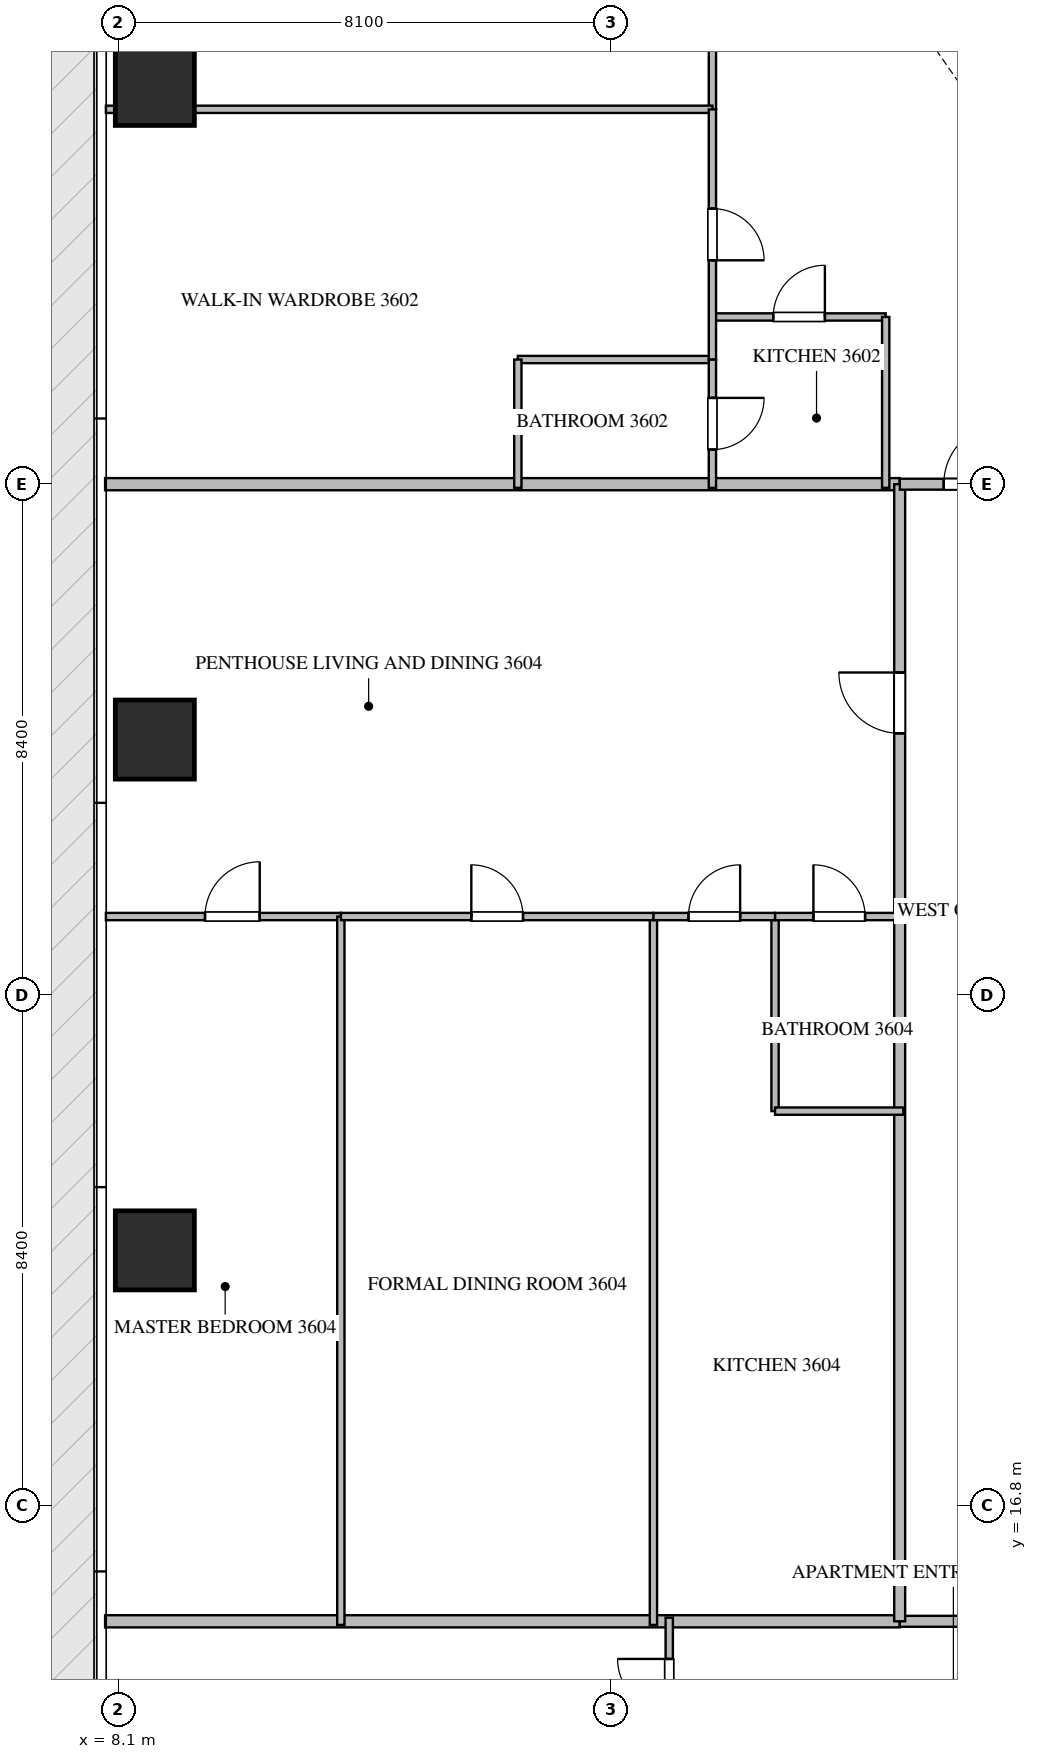
"""IFC4 building model, lengths in metres.
Left out: names, types, materials, properties, quantities, classifications, styles, units other than length and angle.
Written with IfcOpenShell. Run it as: python <this file> out.ifc"""

import sys

from ifc_helpers import new_model, si_unit, direction, frame, frame_2d, origin, origin_2d, place, context, subcontext, project, spatial, rectangle, extrude, source, transform, mapped, element, fill, save


model = new_model("IFC4")
c1 = context("Model", 3, precision=1e-05, world=origin(), true_north=direction((0.0, 1.0)))
c2 = subcontext(c1, "Body", "Model", "MODEL_VIEW")
j1 = project(units=[si_unit("LENGTHUNIT", "METRE"), si_unit("PLANEANGLEUNIT", "RADIAN")], contexts=[c1])
p1 = place(None, origin())
s1 = spatial("IfcSite", under=j1, at=p1, CompositionType="ELEMENT")
p2 = place(p1, origin())
s2 = spatial("IfcBuilding", under=s1, at=p2, CompositionType="ELEMENT")
p3 = place(p2, frame((0.0, 0.0, 146.4)))
s3 = spatial("IfcBuildingStorey", under=s2, at=p3, CompositionType="ELEMENT", Elevation=146.4)
m1 = source(origin(), c2, "Body", "SweptSolid", [
    extrude(rectangle(XDim=1.3, YDim=1.3, at=origin_2d()), origin(), (0.0, 0.0, 1.0), 3.75),
])
for number, where, z_axis, x_axis in (
    (1, (8.7, 21.0, -0.26), (0.0, 0.0, 1.0), (1.0, 0.0, 0.0)),
    (2, (8.7, 29.4, -0.26), (0.0, 0.0, 1.0), (1.0, 0.0, 0.0)),
    (3, (8.7, 40.15, -0.26), (0.0, 0.0, 1.0), (1.0, 0.0, 0.0)),
):
    element("IfcColumn", number, at=place(p3, frame(where, z_axis=z_axis, x_axis=x_axis)), inside=s3, PredefinedType="COLUMN", context=c2, shape_type="MappedRepresentation", body=[
        mapped(m1, transform((0.0, 0.0, 0.0), scale=1.0)),
    ])
for number, where, z_axis, x_axis in (
    (4, (7.882, 14.9, 0.0), (0.0, 0.0, 1.0), (1.0, 0.0, 0.0)),
    (5, (7.882, 33.6, 0.0), (0.0, 0.0, 1.0), (1.0, 0.0, 0.0)),
):
    element("IfcWall", number, at=place(p3, frame(where, z_axis=z_axis, x_axis=x_axis)), inside=s3, PredefinedType="PARTITIONING", context=c2, shape_type="SweptSolid", body=[
        extrude(rectangle(XDim=13.068, YDim=0.2, at=frame_2d((6.534, 0.0))), origin(), (0.0, 0.0, 1.0), 3.49),
    ])
p4 = place(p3, frame((20.952, 14.9, 0.0), z_axis=(0.0, 0.0, 1.0), x_axis=(1.0, 0.0, 0.0)))
e6 = element("IfcWall", 6, at=p4, inside=s3, PredefinedType="PARTITIONING", context=c2, shape_type="SweptSolid", body=[
    extrude(rectangle(XDim=22.896, YDim=0.18, at=frame_2d((11.448, 0.0))), origin(), (0.0, 0.0, 1.0), 3.49),
])
p5 = place(p4, frame((7.51, 0.0, 0.0)))
e7 = element("IfcOpeningElement", 7, at=p5, cuts=e6, PredefinedType="OPENING", context=c2, shape_type="SweptSolid", body=[
    extrude(rectangle(XDim=1.0, YDim=2.15, at=frame_2d((0.5, 1.075))), frame((0.0, 0.1, 0.0), z_axis=(0.0, -1.0, 0.0), x_axis=(1.0, 0.0, 0.0)), (0.0, 0.0, 1.0), 0.2),
])
p6 = place(p3, frame((20.95, 14.9, 0.0), z_axis=(0.0, 0.0, 1.0), x_axis=(0.0, 1.0, 0.0)))
e8 = element("IfcWall", 8, at=p6, inside=s3, PredefinedType="PARTITIONING", context=c2, shape_type="SweptSolid", body=[
    extrude(rectangle(XDim=18.7, YDim=0.18, at=frame_2d((9.35, 0.0))), origin(), (0.0, 0.0, 1.0), 3.49),
])
p7 = place(p6, frame((14.603, 0.0, 0.0)))
e9 = element("IfcOpeningElement", 9, at=p7, cuts=e8, PredefinedType="OPENING", context=c2, shape_type="SweptSolid", body=[
    extrude(rectangle(XDim=1.0, YDim=2.15, at=frame_2d((0.5, 1.075))), frame((0.0, 0.1, 0.0), z_axis=(0.0, -1.0, 0.0), x_axis=(1.0, 0.0, 0.0)), (0.0, 0.0, 1.0), 0.2),
])
p8 = place(p3, frame((20.952, 33.6, 0.0), z_axis=(0.0, 0.0, 1.0), x_axis=(1.0, 0.0, 0.0)))
e10 = element("IfcWall", 10, at=p8, inside=s3, PredefinedType="PARTITIONING", context=c2, shape_type="SweptSolid", body=[
    extrude(rectangle(XDim=2.446, YDim=0.18, at=frame_2d((1.223, 0.0))), origin(), (0.0, 0.0, 1.0), 3.49),
])
p9 = place(p8, frame((0.723, 0.0, 0.0)))
e11 = element("IfcOpeningElement", 11, at=p9, cuts=e10, PredefinedType="OPENING", context=c2, shape_type="SweptSolid", body=[
    extrude(rectangle(XDim=1.0, YDim=2.15, at=frame_2d((0.5, 1.075))), frame((0.0, 0.1, 0.0), z_axis=(0.0, -1.0, 0.0), x_axis=(1.0, 0.0, 0.0)), (0.0, 0.0, 1.0), 0.2),
])
p10 = place(p3, frame((17.16, 12.752, 0.0), z_axis=(0.0, 0.0, 1.0), x_axis=(0.0, 1.0, 0.0)))
e12 = element("IfcWall", 12, at=p10, inside=s3, PredefinedType="PARTITIONING", context=c2, shape_type="SweptSolid", body=[
    extrude(rectangle(XDim=2.208, YDim=0.12, at=frame_2d((1.104, 0.0))), origin(), (0.0, 0.0, 1.0), 3.49),
])
p11 = place(p10, frame((0.679, 0.0, 0.0)))
e13 = element("IfcOpeningElement", 13, at=p11, cuts=e12, PredefinedType="OPENING", context=c2, shape_type="SweptSolid", body=[
    extrude(rectangle(XDim=0.85, YDim=2.1, at=frame_2d((0.425, 1.05))), frame((0.0, 0.07, 0.0), z_axis=(0.0, -1.0, 0.0), x_axis=(1.0, 0.0, 0.0)), (0.0, 0.0, 1.0), 0.14),
])
p12 = place(p3, frame((17.87, 36.35, 0.0), z_axis=(0.0, 0.0, 1.0), x_axis=(1.0, 0.0, 0.0)))
e14 = element("IfcWall", 14, at=p12, inside=s3, PredefinedType="PARTITIONING", context=c2, shape_type="SweptSolid", body=[
    extrude(rectangle(XDim=2.85, YDim=0.12, at=frame_2d((1.425, 0.0))), origin(), (0.0, 0.0, 1.0), 3.49),
])
p13 = place(p12, frame((1.0, 0.0, 0.0)))
e15 = element("IfcOpeningElement", 15, at=p13, cuts=e14, PredefinedType="OPENING", context=c2, shape_type="SweptSolid", body=[
    extrude(rectangle(XDim=0.85, YDim=2.1, at=frame_2d((0.425, 1.05))), frame((0.0, 0.07, 0.0), z_axis=(0.0, -1.0, 0.0), x_axis=(1.0, 0.0, 0.0)), (0.0, 0.0, 1.0), 0.14),
])
p14 = place(p3, frame((20.72, 36.35, 0.0), z_axis=(0.0, 0.0, 1.0), x_axis=(0.0, -1.0, 0.0)))
e16 = element("IfcWall", 16, at=p14, inside=s3, PredefinedType="PARTITIONING", context=c2, shape_type="SweptSolid", body=[
    extrude(rectangle(XDim=2.81, YDim=0.12, at=frame_2d((1.405, 0.0))), origin(), (0.0, 0.0, 1.0), 3.49),
])
p15 = place(p3, frame((17.87, 48.905, 0.0), z_axis=(0.0, 0.0, 1.0), x_axis=(0.0, -1.0, 0.0)))
e17 = element("IfcWall", 17, at=p15, inside=s3, PredefinedType="PARTITIONING", context=c2, shape_type="SweptSolid", body=[
    extrude(rectangle(XDim=9.14, YDim=0.12, at=frame_2d((4.57, 0.0))), origin(), (0.0, 0.0, 1.0), 3.49),
])
p16 = place(p15, frame((4.532, 0.0, 0.0)))
e18 = element("IfcOpeningElement", 18, at=p16, cuts=e17, PredefinedType="OPENING", context=c2, shape_type="SweptSolid", body=[
    extrude(rectangle(XDim=0.9, YDim=2.1, at=frame_2d((0.45, 1.05))), frame((0.0, 0.07, 0.0), z_axis=(0.0, -1.0, 0.0), x_axis=(1.0, 0.0, 0.0)), (0.0, 0.0, 1.0), 0.14),
])
p17 = place(p3, frame((7.895, 39.765, 0.0), z_axis=(0.0, 0.0, 1.0), x_axis=(1.0, 0.0, 0.0)))
e19 = element("IfcWall", 19, at=p17, inside=s3, PredefinedType="PARTITIONING", context=c2, shape_type="SweptSolid", body=[
    extrude(rectangle(XDim=9.975, YDim=0.12, at=frame_2d((4.988, 0.0))), origin(), (0.0, 0.0, 1.0), 3.49),
])
p18 = place(p3, frame((14.67, 35.65, 0.0), z_axis=(0.0, 0.0, 1.0), x_axis=(1.0, 0.0, 0.0)))
e20 = element("IfcWall", 20, at=p18, inside=s3, PredefinedType="PARTITIONING", context=c2, shape_type="SweptSolid", body=[
    extrude(rectangle(XDim=3.2, YDim=0.12, at=frame_2d((1.6, 0.0))), origin(), (0.0, 0.0, 1.0), 3.49),
])
p19 = place(p3, frame((14.67, 35.65, 0.0), z_axis=(0.0, 0.0, 1.0), x_axis=(0.0, -1.0, 0.0)))
e21 = element("IfcWall", 21, at=p19, inside=s3, PredefinedType="PARTITIONING", context=c2, shape_type="SweptSolid", body=[
    extrude(rectangle(XDim=2.11, YDim=0.12, at=frame_2d((1.055, 0.0))), origin(), (0.0, 0.0, 1.0), 3.49),
])
p20 = place(p3, frame((17.87, 39.763, 0.0), z_axis=(0.0, 0.0, 1.0), x_axis=(0.0, -1.0, 0.0)))
e22 = element("IfcWall", 22, at=p20, inside=s3, PredefinedType="PARTITIONING", context=c2, shape_type="SweptSolid", body=[
    extrude(rectangle(XDim=4.113, YDim=0.12, at=frame_2d((2.057, 0.0))), origin(), (0.0, 0.0, 1.0), 3.49),
])
p21 = place(p20, frame((1.631, 0.0, 0.0)))
e23 = element("IfcOpeningElement", 23, at=p21, cuts=e22, PredefinedType="OPENING", context=c2, shape_type="SweptSolid", body=[
    extrude(rectangle(XDim=0.85, YDim=2.1, at=frame_2d((0.425, 1.05))), frame((0.0, 0.07, 0.0), z_axis=(0.0, -1.0, 0.0), x_axis=(1.0, 0.0, 0.0)), (0.0, 0.0, 1.0), 0.14),
])
p22 = place(p3, frame((17.87, 35.648, 0.0), z_axis=(0.0, 0.0, 1.0), x_axis=(0.0, -1.0, 0.0)))
e24 = element("IfcWall", 24, at=p22, inside=s3, PredefinedType="PARTITIONING", context=c2, shape_type="SweptSolid", body=[
    extrude(rectangle(XDim=2.108, YDim=0.12, at=frame_2d((1.054, 0.0))), origin(), (0.0, 0.0, 1.0), 3.49),
])
p23 = place(p22, frame((0.629, 0.0, 0.0)))
e25 = element("IfcOpeningElement", 25, at=p23, cuts=e24, PredefinedType="OPENING", context=c2, shape_type="SweptSolid", body=[
    extrude(rectangle(XDim=0.85, YDim=2.1, at=frame_2d((0.425, 1.05))), frame((0.0, 0.07, 0.0), z_axis=(0.0, -1.0, 0.0), x_axis=(1.0, 0.0, 0.0)), (0.0, 0.0, 1.0), 0.14),
])
p24 = place(p3, frame((7.895, 26.49, 0.0), z_axis=(0.0, 0.0, 1.0), x_axis=(1.0, 0.0, 0.0)))
e26 = element("IfcWall", 26, at=p24, inside=s3, PredefinedType="PARTITIONING", context=c2, shape_type="SweptSolid", body=[
    extrude(rectangle(XDim=3.864, YDim=0.12, at=frame_2d((1.932, 0.0))), origin(), (0.0, 0.0, 1.0), 3.49),
])
p25 = place(p24, frame((1.63, 0.0, 0.0)))
e27 = element("IfcOpeningElement", 27, at=p25, cuts=e26, PredefinedType="OPENING", context=c2, shape_type="SweptSolid", body=[
    extrude(rectangle(XDim=0.9, YDim=2.1, at=frame_2d((0.45, 1.05))), frame((0.0, 0.07, 0.0), z_axis=(0.0, -1.0, 0.0), x_axis=(1.0, 0.0, 0.0)), (0.0, 0.0, 1.0), 0.14),
])
p26 = place(p3, frame((11.759, 14.84, 0.0), z_axis=(0.0, 0.0, 1.0), x_axis=(0.0, 1.0, 0.0)))
e28 = element("IfcWall", 28, at=p26, inside=s3, PredefinedType="PARTITIONING", context=c2, shape_type="SweptSolid", body=[
    extrude(rectangle(XDim=11.65, YDim=0.12, at=frame_2d((5.825, 0.0))), origin(), (0.0, 0.0, 1.0), 3.49),
])
p27 = place(p3, frame((16.9, 14.84, 0.0), z_axis=(0.0, 0.0, 1.0), x_axis=(0.0, 1.0, 0.0)))
e29 = element("IfcWall", 29, at=p27, inside=s3, PredefinedType="PARTITIONING", context=c2, shape_type="SweptSolid", body=[
    extrude(rectangle(XDim=11.65, YDim=0.12, at=frame_2d((5.825, 0.0))), origin(), (0.0, 0.0, 1.0), 2.972),
])
p28 = place(p3, frame((18.9, 23.29, 0.0), z_axis=(0.0, 0.0, 1.0), x_axis=(0.0, 1.0, 0.0)))
e30 = element("IfcWall", 30, at=p28, inside=s3, PredefinedType="PARTITIONING", context=c2, shape_type="SweptSolid", body=[
    extrude(rectangle(XDim=3.2, YDim=0.12, at=frame_2d((1.6, 0.0))), origin(), (0.0, 0.0, 1.0), 3.49),
])
p29 = place(p3, frame((18.9, 23.29, 0.0), z_axis=(0.0, 0.0, 1.0), x_axis=(1.0, 0.0, 0.0)))
e31 = element("IfcWall", 31, at=p29, inside=s3, PredefinedType="PARTITIONING", context=c2, shape_type="SweptSolid", body=[
    extrude(rectangle(XDim=2.11, YDim=0.12, at=frame_2d((1.055, 0.0))), origin(), (0.0, 0.0, 1.0), 3.49),
])
p30 = place(p3, frame((11.761, 26.49, 0.0), z_axis=(0.0, 0.0, 1.0), x_axis=(1.0, 0.0, 0.0)))
e32 = element("IfcWall", 32, at=p30, inside=s3, PredefinedType="PARTITIONING", context=c2, shape_type="SweptSolid", body=[
    extrude(rectangle(XDim=5.139, YDim=0.12, at=frame_2d((2.569, 0.0))), origin(), (0.0, 0.0, 1.0), 3.49),
])
p31 = place(p30, frame((2.144, 0.0, 0.0)))
e33 = element("IfcOpeningElement", 33, at=p31, cuts=e32, PredefinedType="OPENING", context=c2, shape_type="SweptSolid", body=[
    extrude(rectangle(XDim=0.85, YDim=2.1, at=frame_2d((0.425, 1.05))), frame((0.0, 0.07, 0.0), z_axis=(0.0, -1.0, 0.0), x_axis=(1.0, 0.0, 0.0)), (0.0, 0.0, 1.0), 0.14),
])
p32 = place(p3, frame((16.902, 26.49, 0.0), z_axis=(0.0, 0.0, 1.0), x_axis=(1.0, 0.0, 0.0)))
e34 = element("IfcWall", 34, at=p32, inside=s3, PredefinedType="PARTITIONING", context=c2, shape_type="SweptSolid", body=[
    extrude(rectangle(XDim=1.998, YDim=0.12, at=frame_2d((0.999, 0.0))), origin(), (0.0, 0.0, 1.0), 3.49),
])
p33 = place(p32, frame((0.574, 0.0, 0.0)))
e35 = element("IfcOpeningElement", 35, at=p33, cuts=e34, PredefinedType="OPENING", context=c2, shape_type="SweptSolid", body=[
    extrude(rectangle(XDim=0.85, YDim=2.1, at=frame_2d((0.425, 1.05))), frame((0.0, 0.07, 0.0), z_axis=(0.0, -1.0, 0.0), x_axis=(1.0, 0.0, 0.0)), (0.0, 0.0, 1.0), 0.14),
])
p34 = place(p3, frame((18.902, 26.49, 0.0), z_axis=(0.0, 0.0, 1.0), x_axis=(1.0, 0.0, 0.0)))
e36 = element("IfcWall", 36, at=p34, inside=s3, PredefinedType="PARTITIONING", context=c2, shape_type="SweptSolid", body=[
    extrude(rectangle(XDim=2.108, YDim=0.12, at=frame_2d((1.054, 0.0))), origin(), (0.0, 0.0, 1.0), 3.49),
])
p35 = place(p34, frame((0.629, 0.0, 0.0)))
e37 = element("IfcOpeningElement", 37, at=p35, cuts=e36, PredefinedType="OPENING", context=c2, shape_type="SweptSolid", body=[
    extrude(rectangle(XDim=0.85, YDim=2.1, at=frame_2d((0.425, 1.05))), frame((0.0, 0.07, 0.0), z_axis=(0.0, -1.0, 0.0), x_axis=(1.0, 0.0, 0.0)), (0.0, 0.0, 1.0), 0.14),
])
m2 = source(origin(), c2, "Body", "SweptSolid", [
    extrude(rectangle(XDim=1.0, YDim=2.15, at=frame_2d((0.5, 1.075))), frame((0.0, 0.025, 0.0), z_axis=(0.0, -1.0, 0.0), x_axis=(1.0, 0.0, 0.0)), (0.0, 0.0, 1.0), 0.05),
])
p36 = place(p7, origin())
e38 = element("IfcDoor", 38, at=p36, inside=s3, OperationType="SINGLE_SWING_RIGHT", PredefinedType="DOOR", context=c2, shape_type="MappedRepresentation", body=[
    mapped(m2, transform((0.0, 0.0, 0.0), scale=1.0)),
])
fill(e9, e38)
p37 = place(p9, origin())
e39 = element("IfcDoor", 39, at=p37, inside=s3, OperationType="SINGLE_SWING_RIGHT", PredefinedType="DOOR", context=c2, shape_type="MappedRepresentation", body=[
    mapped(m2, transform((0.0, 0.0, 0.0), scale=1.0)),
])
fill(e11, e39)
m3 = source(origin(), c2, "Body", "SweptSolid", [
    extrude(rectangle(XDim=0.85, YDim=2.1, at=frame_2d((0.425, 1.05))), frame((0.0, 0.025, 0.0), z_axis=(0.0, -1.0, 0.0), x_axis=(1.0, 0.0, 0.0)), (0.0, 0.0, 1.0), 0.05),
])
p38 = place(p11, origin())
e40 = element("IfcDoor", 40, at=p38, inside=s3, OperationType="SINGLE_SWING_RIGHT", PredefinedType="DOOR", context=c2, shape_type="MappedRepresentation", body=[
    mapped(m3, transform((0.0, 0.0, 0.0), scale=1.0)),
])
fill(e13, e40)
p39 = place(p13, origin())
e41 = element("IfcDoor", 41, at=p39, inside=s3, OperationType="SINGLE_SWING_RIGHT", PredefinedType="DOOR", context=c2, shape_type="MappedRepresentation", body=[
    mapped(m3, transform((0.0, 0.0, 0.0), scale=1.0)),
])
fill(e15, e41)
p40 = place(p21, origin())
e42 = element("IfcDoor", 42, at=p40, inside=s3, OperationType="SINGLE_SWING_RIGHT", PredefinedType="DOOR", context=c2, shape_type="MappedRepresentation", body=[
    mapped(m3, transform((0.0, 0.0, 0.0), scale=1.0)),
])
fill(e23, e42)
p41 = place(p23, origin())
e43 = element("IfcDoor", 43, at=p41, inside=s3, OperationType="SINGLE_SWING_LEFT", PredefinedType="DOOR", context=c2, shape_type="MappedRepresentation", body=[
    mapped(m3, transform((0.0, 0.0, 0.0), scale=1.0)),
])
fill(e25, e43)
m4 = source(origin(), c2, "Body", "SweptSolid", [
    extrude(rectangle(XDim=0.9, YDim=2.1, at=frame_2d((0.45, 1.05))), frame((0.0, 0.025, 0.0), z_axis=(0.0, -1.0, 0.0), x_axis=(1.0, 0.0, 0.0)), (0.0, 0.0, 1.0), 0.05),
])
p42 = place(p25, origin())
e44 = element("IfcDoor", 44, at=p42, inside=s3, OperationType="SINGLE_SWING_RIGHT", PredefinedType="DOOR", context=c2, shape_type="MappedRepresentation", body=[
    mapped(m4, transform((0.0, 0.0, 0.0), scale=1.0)),
])
fill(e27, e44)
p43 = place(p31, origin())
e45 = element("IfcDoor", 45, at=p43, inside=s3, OperationType="SINGLE_SWING_LEFT", PredefinedType="DOOR", context=c2, shape_type="MappedRepresentation", body=[
    mapped(m3, transform((0.0, 0.0, 0.0), scale=1.0)),
])
fill(e33, e45)
p44 = place(p33, origin())
e46 = element("IfcDoor", 46, at=p44, inside=s3, OperationType="SINGLE_SWING_RIGHT", PredefinedType="DOOR", context=c2, shape_type="MappedRepresentation", body=[
    mapped(m3, transform((0.0, 0.0, 0.0), scale=1.0)),
])
fill(e35, e46)
p45 = place(p35, origin())
e47 = element("IfcDoor", 47, at=p45, inside=s3, OperationType="SINGLE_SWING_LEFT", PredefinedType="DOOR", context=c2, shape_type="MappedRepresentation", body=[
    mapped(m3, transform((0.0, 0.0, 0.0), scale=1.0)),
])
fill(e37, e47)
save(model, sys.argv[1])
